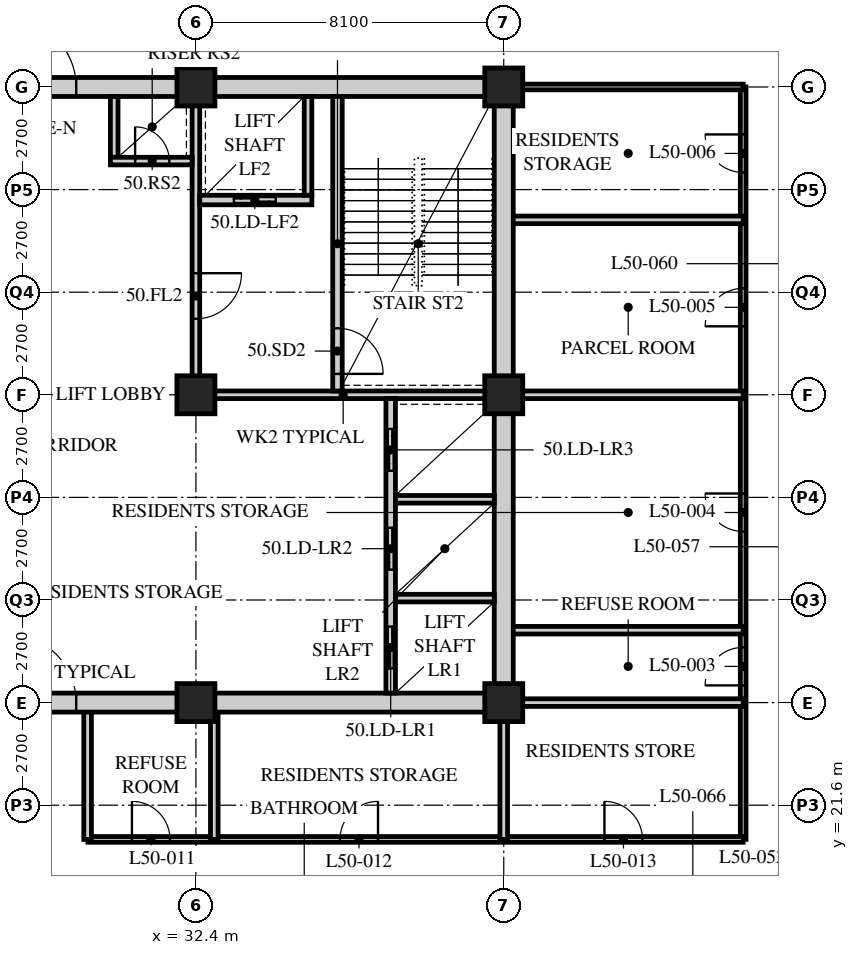
"""IFC4 building model, lengths in metres.
Left out: names, types, materials, properties, quantities, classifications, styles, units other than length and angle.
Written with IfcOpenShell. Run it as: python <this file> out.ifc"""

import sys

from ifc_helpers import new_model, si_unit, direction, frame, frame_2d, origin, origin_2d, place, context, subcontext, project, spatial, rectangle, hollow_rectangle, extrude, element, fill, save


model = new_model("IFC4")
c1 = context("Model", 3, precision=1e-05, world=origin(), true_north=direction((0.0, 1.0)))
c2 = subcontext(c1, "Body", "Model", "MODEL_VIEW")
j1 = project(units=[si_unit("LENGTHUNIT", "METRE"), si_unit("PLANEANGLEUNIT", "RADIAN")], contexts=[c1])
p1 = place(None, origin())
s1 = spatial("IfcSite", under=j1, at=p1, CompositionType="ELEMENT")
p2 = place(p1, origin())
s2 = spatial("IfcBuilding", under=s1, at=p2, CompositionType="ELEMENT")
p3 = place(p2, frame((0.0, 0.0, 195.6)))
s3 = spatial("IfcBuildingStorey", under=s2, at=p3, CompositionType="ELEMENT", Elevation=195.6)
for number, where, z_axis, x_axis in (
    (1, (32.4, 24.3, 0.0), (0.0, 0.0, 1.0), (1.0, 0.0, 0.0)),
    (2, (32.4, 32.4, 0.0), (0.0, 0.0, 1.0), (1.0, 0.0, 0.0)),
    (3, (32.4, 40.5, 0.0), (0.0, 0.0, 1.0), (1.0, 0.0, 0.0)),
    (4, (40.5, 24.3, 0.0), (0.0, 0.0, 1.0), (1.0, 0.0, 0.0)),
    (5, (40.5, 32.4, 0.0), (0.0, 0.0, 1.0), (1.0, 0.0, 0.0)),
    (6, (40.5, 40.5, 0.0), (0.0, 0.0, 1.0), (1.0, 0.0, 0.0)),
):
    element("IfcColumn", number, at=place(p3, frame(where, z_axis=z_axis, x_axis=x_axis)), inside=s3, PredefinedType="COLUMN", context=c2, shape_type="SweptSolid", body=[
        extrude(hollow_rectangle(XDim=1.0, YDim=1.0, WallThickness=0.1, at=origin_2d()), origin(), (0.0, 0.0, 1.0), 3.6),
    ])
p4 = place(p3, frame((46.8, 20.7, 0.0), z_axis=(0.0, 0.0, 1.0), x_axis=(0.0, 1.0, 0.0)))
e7 = element("IfcWall", 7, at=p4, inside=s3, PredefinedType="PARTITIONING", context=c2, shape_type="SweptSolid", body=[
    extrude(rectangle(XDim=19.8, YDim=0.15, at=frame_2d((9.9, 0.0))), origin(), (0.0, 0.0, 1.0), 3.39),
])
p5 = place(p4, frame((4.052, 0.0, 0.0)))
e8 = element("IfcOpeningElement", 8, at=p5, cuts=e7, PredefinedType="OPENING", context=c2, shape_type="SweptSolid", body=[
    extrude(rectangle(XDim=1.0, YDim=2.1, at=frame_2d((0.5, 1.05))), frame((0.0, 0.085, 0.0), z_axis=(0.0, -1.0, 0.0), x_axis=(1.0, 0.0, 0.0)), (0.0, 0.0, 1.0), 0.17),
])
p6 = place(p4, frame((8.102, 0.0, 0.0)))
e9 = element("IfcOpeningElement", 9, at=p6, cuts=e7, PredefinedType="OPENING", context=c2, shape_type="SweptSolid", body=[
    extrude(rectangle(XDim=1.0, YDim=2.1, at=frame_2d((0.5, 1.05))), frame((0.0, 0.085, 0.0), z_axis=(0.0, -1.0, 0.0), x_axis=(1.0, 0.0, 0.0)), (0.0, 0.0, 1.0), 0.17),
])
p7 = place(p4, frame((13.502, 0.0, 0.0)))
e10 = element("IfcOpeningElement", 10, at=p7, cuts=e7, PredefinedType="OPENING", context=c2, shape_type="SweptSolid", body=[
    extrude(rectangle(XDim=1.0, YDim=2.1, at=frame_2d((0.5, 1.05))), frame((0.0, 0.085, 0.0), z_axis=(0.0, -1.0, 0.0), x_axis=(1.0, 0.0, 0.0)), (0.0, 0.0, 1.0), 0.17),
])
p8 = place(p4, frame((17.552, 0.0, 0.0)))
e11 = element("IfcOpeningElement", 11, at=p8, cuts=e7, PredefinedType="OPENING", context=c2, shape_type="SweptSolid", body=[
    extrude(rectangle(XDim=1.0, YDim=2.1, at=frame_2d((0.5, 1.05))), frame((0.0, 0.085, 0.0), z_axis=(0.0, -1.0, 0.0), x_axis=(1.0, 0.0, 0.0)), (0.0, 0.0, 1.0), 0.17),
])
p9 = place(p3, frame((46.8, 40.5, 0.0), z_axis=(0.0, 0.0, 1.0), x_axis=(-1.0, 0.0, 0.0)))
e12 = element("IfcWall", 12, at=p9, inside=s3, PredefinedType="PARTITIONING", context=c2, shape_type="SweptSolid", body=[
    extrude(rectangle(XDim=6.1, YDim=0.15, at=frame_2d((3.05, 0.0))), origin(), (0.0, 0.0, 1.0), 3.39),
])
p10 = place(p3, frame((29.56, 20.7, 0.0), z_axis=(0.0, 0.0, 1.0), x_axis=(1.0, 0.0, 0.0)))
e13 = element("IfcWall", 13, at=p10, inside=s3, PredefinedType="PARTITIONING", context=c2, shape_type="SweptSolid", body=[
    extrude(rectangle(XDim=17.24, YDim=0.15, at=frame_2d((8.62, 0.0))), origin(), (0.0, 0.0, 1.0), 3.39),
])
p11 = place(p10, frame((1.157, 0.0, 0.0)))
e14 = element("IfcOpeningElement", 14, at=p11, cuts=e13, PredefinedType="OPENING", context=c2, shape_type="SweptSolid", body=[
    extrude(rectangle(XDim=1.0, YDim=2.1, at=frame_2d((0.5, 1.05))), frame((0.0, 0.085, 0.0), z_axis=(0.0, -1.0, 0.0), x_axis=(1.0, 0.0, 0.0)), (0.0, 0.0, 1.0), 0.17),
])
p12 = place(p10, frame((6.632, 0.0, 0.0)))
e15 = element("IfcOpeningElement", 15, at=p12, cuts=e13, PredefinedType="OPENING", context=c2, shape_type="SweptSolid", body=[
    extrude(rectangle(XDim=1.0, YDim=2.1, at=frame_2d((0.5, 1.05))), frame((0.0, 0.085, 0.0), z_axis=(0.0, -1.0, 0.0), x_axis=(1.0, 0.0, 0.0)), (0.0, 0.0, 1.0), 0.17),
])
p13 = place(p10, frame((13.59, 0.0, 0.0)))
e16 = element("IfcOpeningElement", 16, at=p13, cuts=e13, PredefinedType="OPENING", context=c2, shape_type="SweptSolid", body=[
    extrude(rectangle(XDim=1.0, YDim=2.1, at=frame_2d((0.5, 1.05))), frame((0.0, 0.085, 0.0), z_axis=(0.0, -1.0, 0.0), x_axis=(1.0, 0.0, 0.0)), (0.0, 0.0, 1.0), 0.17),
])
for number, where, z_axis, x_axis in (
    (17, (40.5, 32.4, 0.0), (0.0, 0.0, 1.0), (1.0, 0.0, 0.0)),
    (18, (46.8, 26.205, 0.0), (0.0, 0.0, 1.0), (-1.0, 0.0, 0.0)),
    (19, (46.8, 37.003, 0.0), (0.0, 0.0, 1.0), (-1.0, 0.0, 0.0)),
):
    element("IfcWall", number, at=place(p3, frame(where, z_axis=z_axis, x_axis=x_axis)), inside=s3, PredefinedType="SOLIDWALL", context=c2, shape_type="SweptSolid", body=[
        extrude(rectangle(XDim=6.3, YDim=0.2, at=frame_2d((3.15, 0.0))), origin(), (0.0, 0.0, 1.0), 3.39),
    ])
p14 = place(p3, frame((40.5, 20.7, 0.0), z_axis=(0.0, 0.0, 1.0), x_axis=(0.0, 1.0, 0.0)))
e20 = element("IfcWall", 20, at=p14, inside=s3, PredefinedType="SOLIDWALL", context=c2, shape_type="SweptSolid", body=[
    extrude(rectangle(XDim=3.6, YDim=0.2, at=frame_2d((1.8, 0.0))), origin(), (0.0, 0.0, 1.0), 2.778),
])
for number, where, z_axis, x_axis in (
    (21, (32.883, 20.7, 0.0), (0.0, 0.0, 1.0), (0.0, 1.0, 0.0)),
    (22, (29.55, 20.7, 0.0), (0.0, 0.0, 1.0), (0.0, 1.0, 0.0)),
):
    element("IfcWall", number, at=place(p3, frame(where, z_axis=z_axis, x_axis=x_axis)), inside=s3, PredefinedType="SOLIDWALL", context=c2, shape_type="SweptSolid", body=[
        extrude(rectangle(XDim=3.6, YDim=0.2, at=frame_2d((1.8, 0.0))), origin(), (0.0, 0.0, 1.0), 3.39),
    ])
p15 = place(p3, frame((40.5, 24.3, 0.0), z_axis=(0.0, 0.0, 1.0), x_axis=(1.0, 0.0, 0.0)))
e23 = element("IfcWall", 23, at=p15, inside=s3, PredefinedType="SOLIDWALL", context=c2, shape_type="SweptSolid", body=[
    extrude(rectangle(XDim=6.3, YDim=0.2, at=frame_2d((3.15, 0.0))), origin(), (0.0, 0.0, 1.0), 3.39),
])
p16 = place(p3, frame((15.95, 24.3, 0.0), z_axis=(0.0, 0.0, 1.0), x_axis=(1.0, 0.0, 0.0)))
e24 = element("IfcWall", 24, at=p16, inside=s3, PredefinedType="SOLIDWALL", context=c2, shape_type="SweptSolid", body=[
    extrude(rectangle(XDim=24.8, YDim=0.5, at=frame_2d((12.4, 0.0))), origin(), (0.0, 0.0, 1.0), 2.74),
])
p17 = place(p16, frame((11.5, 0.0, 0.0)))
e25 = element("IfcOpeningElement", 25, at=p17, cuts=e24, PredefinedType="OPENING", context=c2, shape_type="SweptSolid", body=[
    extrude(rectangle(XDim=1.8, YDim=2.4, at=frame_2d((0.9, 1.2))), frame((0.0, 0.26, 0.0), z_axis=(0.0, -1.0, 0.0), x_axis=(1.0, 0.0, 0.0)), (0.0, 0.0, 1.0), 0.52),
])
p18 = place(p3, frame((15.95, 40.5, 0.0), z_axis=(0.0, 0.0, 1.0), x_axis=(1.0, 0.0, 0.0)))
e26 = element("IfcWall", 26, at=p18, inside=s3, PredefinedType="SOLIDWALL", context=c2, shape_type="SweptSolid", body=[
    extrude(rectangle(XDim=24.8, YDim=0.5, at=frame_2d((12.4, 0.0))), origin(), (0.0, 0.0, 1.0), 2.74),
])
p19 = place(p18, frame((11.5, 0.0, 0.0)))
e27 = element("IfcOpeningElement", 27, at=p19, cuts=e26, PredefinedType="OPENING", context=c2, shape_type="SweptSolid", body=[
    extrude(rectangle(XDim=1.8, YDim=2.4, at=frame_2d((0.9, 1.2))), frame((0.0, 0.26, 0.0), z_axis=(0.0, -1.0, 0.0), x_axis=(1.0, 0.0, 0.0)), (0.0, 0.0, 1.0), 0.52),
])
p20 = place(p3, frame((40.5, 24.55, 0.0), z_axis=(0.0, 0.0, 1.0), x_axis=(0.0, 1.0, 0.0)))
e28 = element("IfcWall", 28, at=p20, inside=s3, PredefinedType="SOLIDWALL", context=c2, shape_type="SweptSolid", body=[
    extrude(rectangle(XDim=15.7, YDim=0.5, at=frame_2d((7.85, 0.0))), origin(), (0.0, 0.0, 1.0), 2.778),
])
p21 = place(p3, frame((32.3, 32.4, 0.0), z_axis=(0.0, 0.0, 1.0), x_axis=(1.0, 0.0, 0.0)))
e29 = element("IfcWall", 29, at=p21, inside=s3, PredefinedType="SOLIDWALL", context=c2, shape_type="SweptSolid", body=[
    extrude(rectangle(XDim=7.95, YDim=0.2, at=frame_2d((3.975, 0.0))), origin(), (0.0, 0.0, 1.0), 2.778),
])
p22 = place(p3, frame((32.4, 32.5, 0.0), z_axis=(0.0, 0.0, 1.0), x_axis=(0.0, 1.0, 0.0)))
e30 = element("IfcWall", 30, at=p22, inside=s3, PredefinedType="SOLIDWALL", context=c2, shape_type="SweptSolid", body=[
    extrude(rectangle(XDim=7.75, YDim=0.2, at=frame_2d((3.875, 0.0))), origin(), (0.0, 0.0, 1.0), 2.778),
])
p23 = place(p22, frame((1.9, 0.0, 0.0)))
e31 = element("IfcOpeningElement", 31, at=p23, cuts=e30, PredefinedType="OPENING", context=c2, shape_type="SweptSolid", body=[
    extrude(rectangle(XDim=1.2, YDim=2.1, at=frame_2d((0.6, 1.05))), frame((0.0, 0.11, 0.0), z_axis=(0.0, -1.0, 0.0), x_axis=(1.0, 0.0, 0.0)), (0.0, 0.0, 1.0), 0.22),
])
p24 = place(p3, frame((37.525, 24.55, 0.0), z_axis=(0.0, 0.0, 1.0), x_axis=(0.0, 1.0, 0.0)))
e32 = element("IfcWall", 32, at=p24, inside=s3, PredefinedType="SOLIDWALL", context=c2, shape_type="SweptSolid", body=[
    extrude(rectangle(XDim=7.75, YDim=0.25, at=frame_2d((3.875, 0.0))), origin(), (0.0, 0.0, 1.0), 3.39),
])
p25 = place(p24, frame((0.65, 0.0, 0.0)))
e33 = element("IfcOpeningElement", 33, at=p25, cuts=e32, PredefinedType="OPENING", context=c2, shape_type="SweptSolid", body=[
    extrude(rectangle(XDim=1.1, YDim=2.4, at=frame_2d((0.55, 1.2))), frame((0.0, 0.135, 0.0), z_axis=(0.0, -1.0, 0.0), x_axis=(1.0, 0.0, 0.0)), (0.0, 0.0, 1.0), 0.27),
])
p26 = place(p24, frame((3.25, 0.0, 0.0)))
e34 = element("IfcOpeningElement", 34, at=p26, cuts=e32, PredefinedType="OPENING", context=c2, shape_type="SweptSolid", body=[
    extrude(rectangle(XDim=1.1, YDim=2.4, at=frame_2d((0.55, 1.2))), frame((0.0, 0.135, 0.0), z_axis=(0.0, -1.0, 0.0), x_axis=(1.0, 0.0, 0.0)), (0.0, 0.0, 1.0), 0.27),
])
p27 = place(p24, frame((5.85, 0.0, 0.0)))
e35 = element("IfcOpeningElement", 35, at=p27, cuts=e32, PredefinedType="OPENING", context=c2, shape_type="SweptSolid", body=[
    extrude(rectangle(XDim=1.1, YDim=2.4, at=frame_2d((0.55, 1.2))), frame((0.0, 0.135, 0.0), z_axis=(0.0, -1.0, 0.0), x_axis=(1.0, 0.0, 0.0)), (0.0, 0.0, 1.0), 0.27),
])
for number, where, z_axis, x_axis in (
    (36, (37.65, 27.05, 0.0), (0.0, 0.0, 1.0), (1.0, 0.0, 0.0)),
    (37, (37.65, 29.65, 0.0), (0.0, 0.0, 1.0), (1.0, 0.0, 0.0)),
):
    element("IfcWall", number, at=place(p3, frame(where, z_axis=z_axis, x_axis=x_axis)), inside=s3, PredefinedType="SOLIDWALL", context=c2, shape_type="SweptSolid", body=[
        extrude(rectangle(XDim=2.6, YDim=0.2, at=frame_2d((1.3, 0.0))), origin(), (0.0, 0.0, 1.0), 3.39),
    ])
p28 = place(p3, frame((36.125, 32.5, 0.0), z_axis=(0.0, 0.0, 1.0), x_axis=(0.0, 1.0, 0.0)))
e38 = element("IfcWall", 38, at=p28, inside=s3, PredefinedType="SOLIDWALL", context=c2, shape_type="SweptSolid", body=[
    extrude(rectangle(XDim=7.75, YDim=0.25, at=frame_2d((3.875, 0.0))), origin(), (0.0, 0.0, 1.0), 3.39),
])
p29 = place(p28, frame((0.45, 0.0, 0.0)))
e39 = element("IfcOpeningElement", 39, at=p29, cuts=e38, PredefinedType="OPENING", context=c2, shape_type="SweptSolid", body=[
    extrude(rectangle(XDim=1.2, YDim=2.1, at=frame_2d((0.6, 1.05))), frame((0.0, 0.135, 0.0), z_axis=(0.0, -1.0, 0.0), x_axis=(1.0, 0.0, 0.0)), (0.0, 0.0, 1.0), 0.27),
])
p30 = place(p3, frame((32.5, 37.525, 0.0), z_axis=(0.0, 0.0, 1.0), x_axis=(1.0, 0.0, 0.0)))
e40 = element("IfcWall", 40, at=p30, inside=s3, PredefinedType="SOLIDWALL", context=c2, shape_type="SweptSolid", body=[
    extrude(rectangle(XDim=2.95, YDim=0.25, at=frame_2d((1.475, 0.0))), origin(), (0.0, 0.0, 1.0), 3.39),
])
p31 = place(p30, frame((0.9, 0.0, 0.0)))
e41 = element("IfcOpeningElement", 41, at=p31, cuts=e40, PredefinedType="OPENING", context=c2, shape_type="SweptSolid", body=[
    extrude(rectangle(XDim=1.1, YDim=2.4, at=frame_2d((0.55, 1.2))), frame((0.0, 0.135, 0.0), z_axis=(0.0, -1.0, 0.0), x_axis=(1.0, 0.0, 0.0)), (0.0, 0.0, 1.0), 0.27),
])
p32 = place(p3, frame((35.35, 37.65, 0.0), z_axis=(0.0, 0.0, 1.0), x_axis=(0.0, 1.0, 0.0)))
e42 = element("IfcWall", 42, at=p32, inside=s3, PredefinedType="SOLIDWALL", context=c2, shape_type="SweptSolid", body=[
    extrude(rectangle(XDim=2.6, YDim=0.2, at=frame_2d((1.3, 0.0))), origin(), (0.0, 0.0, 1.0), 3.39),
])
p33 = place(p3, frame((30.25, 38.65, 0.0), z_axis=(0.0, 0.0, 1.0), x_axis=(0.0, 1.0, 0.0)))
e43 = element("IfcWall", 43, at=p33, inside=s3, PredefinedType="SOLIDWALL", context=c2, shape_type="SweptSolid", body=[
    extrude(rectangle(XDim=1.6, YDim=0.2, at=frame_2d((0.8, 0.0))), origin(), (0.0, 0.0, 1.0), 3.39),
])
p34 = place(p3, frame((30.15, 38.55, 0.0), z_axis=(0.0, 0.0, 1.0), x_axis=(1.0, 0.0, 0.0)))
e44 = element("IfcWall", 44, at=p34, inside=s3, PredefinedType="SOLIDWALL", context=c2, shape_type="SweptSolid", body=[
    extrude(rectangle(XDim=2.15, YDim=0.2, at=frame_2d((1.075, 0.0))), origin(), (0.0, 0.0, 1.0), 3.39),
])
p35 = place(p34, frame((0.65, 0.0, 0.0)))
e45 = element("IfcOpeningElement", 45, at=p35, cuts=e44, PredefinedType="OPENING", context=c2, shape_type="SweptSolid", body=[
    extrude(rectangle(XDim=0.9, YDim=2.1, at=frame_2d((0.45, 1.05))), frame((0.0, 0.11, 0.0), z_axis=(0.0, -1.0, 0.0), x_axis=(1.0, 0.0, 0.0)), (0.0, 0.0, 1.0), 0.22),
])
p36 = place(p5, origin())
e46 = element("IfcDoor", 46, at=p36, inside=s3, OperationType="SINGLE_SWING_LEFT", PredefinedType="DOOR", context=c2, shape_type="SweptSolid", body=[
    extrude(rectangle(XDim=1.0, YDim=2.1, at=frame_2d((0.5, 1.05))), frame((0.0, 0.025, 0.0), z_axis=(0.0, -1.0, 0.0), x_axis=(1.0, 0.0, 0.0)), (0.0, 0.0, 1.0), 0.05),
])
fill(e8, e46)
p37 = place(p6, origin())
e47 = element("IfcDoor", 47, at=p37, inside=s3, OperationType="SINGLE_SWING_RIGHT", PredefinedType="DOOR", context=c2, shape_type="SweptSolid", body=[
    extrude(rectangle(XDim=1.0, YDim=2.1, at=frame_2d((0.5, 1.05))), frame((0.0, 0.025, 0.0), z_axis=(0.0, -1.0, 0.0), x_axis=(1.0, 0.0, 0.0)), (0.0, 0.0, 1.0), 0.05),
])
fill(e9, e47)
p38 = place(p7, origin())
e48 = element("IfcDoor", 48, at=p38, inside=s3, OperationType="SINGLE_SWING_LEFT", PredefinedType="DOOR", context=c2, shape_type="SweptSolid", body=[
    extrude(rectangle(XDim=1.0, YDim=2.1, at=frame_2d((0.5, 1.05))), frame((0.0, 0.025, 0.0), z_axis=(0.0, -1.0, 0.0), x_axis=(1.0, 0.0, 0.0)), (0.0, 0.0, 1.0), 0.05),
])
fill(e10, e48)
p39 = place(p8, origin())
e49 = element("IfcDoor", 49, at=p39, inside=s3, OperationType="SINGLE_SWING_RIGHT", PredefinedType="DOOR", context=c2, shape_type="SweptSolid", body=[
    extrude(rectangle(XDim=1.0, YDim=2.1, at=frame_2d((0.5, 1.05))), frame((0.0, 0.025, 0.0), z_axis=(0.0, -1.0, 0.0), x_axis=(1.0, 0.0, 0.0)), (0.0, 0.0, 1.0), 0.05),
])
fill(e11, e49)
p40 = place(p11, origin())
e50 = element("IfcDoor", 50, at=p40, inside=s3, OperationType="SINGLE_SWING_LEFT", PredefinedType="DOOR", context=c2, shape_type="SweptSolid", body=[
    extrude(rectangle(XDim=1.0, YDim=2.1, at=frame_2d((0.5, 1.05))), frame((0.0, 0.025, 0.0), z_axis=(0.0, -1.0, 0.0), x_axis=(1.0, 0.0, 0.0)), (0.0, 0.0, 1.0), 0.05),
])
fill(e14, e50)
p41 = place(p12, origin())
e51 = element("IfcDoor", 51, at=p41, inside=s3, OperationType="SINGLE_SWING_RIGHT", PredefinedType="DOOR", context=c2, shape_type="SweptSolid", body=[
    extrude(rectangle(XDim=1.0, YDim=2.1, at=frame_2d((0.5, 1.05))), frame((0.0, 0.025, 0.0), z_axis=(0.0, -1.0, 0.0), x_axis=(1.0, 0.0, 0.0)), (0.0, 0.0, 1.0), 0.05),
])
fill(e15, e51)
p42 = place(p13, origin())
e52 = element("IfcDoor", 52, at=p42, inside=s3, OperationType="SINGLE_SWING_LEFT", PredefinedType="DOOR", context=c2, shape_type="SweptSolid", body=[
    extrude(rectangle(XDim=1.0, YDim=2.1, at=frame_2d((0.5, 1.05))), frame((0.0, 0.025, 0.0), z_axis=(0.0, -1.0, 0.0), x_axis=(1.0, 0.0, 0.0)), (0.0, 0.0, 1.0), 0.05),
])
fill(e16, e52)
p43 = place(p29, origin())
e53 = element("IfcDoor", 53, at=p43, inside=s3, OperationType="SINGLE_SWING_RIGHT", PredefinedType="DOOR", context=c2, shape_type="SweptSolid", body=[
    extrude(rectangle(XDim=1.2, YDim=2.1, at=frame_2d((0.6, 1.05))), frame((0.0, 0.025, 0.0), z_axis=(0.0, -1.0, 0.0), x_axis=(1.0, 0.0, 0.0)), (0.0, 0.0, 1.0), 0.05),
])
fill(e39, e53)
p44 = place(p23, origin())
e54 = element("IfcDoor", 54, at=p44, inside=s3, OperationType="SINGLE_SWING_LEFT", PredefinedType="DOOR", context=c2, shape_type="SweptSolid", body=[
    extrude(rectangle(XDim=1.2, YDim=2.1, at=frame_2d((0.6, 1.05))), frame((0.0, 0.025, 0.0), z_axis=(0.0, -1.0, 0.0), x_axis=(1.0, 0.0, 0.0)), (0.0, 0.0, 1.0), 0.05),
])
fill(e31, e54)
p45 = place(p35, origin())
e55 = element("IfcDoor", 55, at=p45, inside=s3, OperationType="SINGLE_SWING_LEFT", PredefinedType="DOOR", context=c2, shape_type="SweptSolid", body=[
    extrude(rectangle(XDim=0.9, YDim=2.1, at=frame_2d((0.45, 1.05))), frame((0.0, 0.025, 0.0), z_axis=(0.0, -1.0, 0.0), x_axis=(1.0, 0.0, 0.0)), (0.0, 0.0, 1.0), 0.05),
])
fill(e45, e55)
p46 = place(p25, origin())
e56 = element("IfcDoor", 56, at=p46, inside=s3, OperationType="DOUBLE_DOOR_SLIDING", PredefinedType="DOOR", context=c2, shape_type="SweptSolid", body=[
    extrude(rectangle(XDim=1.1, YDim=2.4, at=frame_2d((0.55, 1.2))), frame((0.0, 0.025, 0.0), z_axis=(0.0, -1.0, 0.0), x_axis=(1.0, 0.0, 0.0)), (0.0, 0.0, 1.0), 0.05),
])
fill(e33, e56)
p47 = place(p26, origin())
e57 = element("IfcDoor", 57, at=p47, inside=s3, OperationType="DOUBLE_DOOR_SLIDING", PredefinedType="DOOR", context=c2, shape_type="SweptSolid", body=[
    extrude(rectangle(XDim=1.1, YDim=2.4, at=frame_2d((0.55, 1.2))), frame((0.0, 0.025, 0.0), z_axis=(0.0, -1.0, 0.0), x_axis=(1.0, 0.0, 0.0)), (0.0, 0.0, 1.0), 0.05),
])
fill(e34, e57)
p48 = place(p27, origin())
e58 = element("IfcDoor", 58, at=p48, inside=s3, OperationType="DOUBLE_DOOR_SLIDING", PredefinedType="DOOR", context=c2, shape_type="SweptSolid", body=[
    extrude(rectangle(XDim=1.1, YDim=2.4, at=frame_2d((0.55, 1.2))), frame((0.0, 0.025, 0.0), z_axis=(0.0, -1.0, 0.0), x_axis=(1.0, 0.0, 0.0)), (0.0, 0.0, 1.0), 0.05),
])
fill(e35, e58)
p49 = place(p31, origin())
e59 = element("IfcDoor", 59, at=p49, inside=s3, OperationType="DOUBLE_DOOR_SLIDING", PredefinedType="DOOR", context=c2, shape_type="SweptSolid", body=[
    extrude(rectangle(XDim=1.1, YDim=2.4, at=frame_2d((0.55, 1.2))), frame((0.0, 0.025, 0.0), z_axis=(0.0, -1.0, 0.0), x_axis=(1.0, 0.0, 0.0)), (0.0, 0.0, 1.0), 0.05),
])
fill(e41, e59)
p50 = place(p17, origin())
e60 = element("IfcDoor", 60, at=p50, inside=s3, OperationType="DOUBLE_DOOR_SINGLE_SWING", PredefinedType="DOOR", context=c2, shape_type="SweptSolid", body=[
    extrude(rectangle(XDim=1.8, YDim=2.4, at=frame_2d((0.9, 1.2))), frame((0.0, 0.025, 0.0), z_axis=(0.0, -1.0, 0.0), x_axis=(1.0, 0.0, 0.0)), (0.0, 0.0, 1.0), 0.05),
])
fill(e25, e60)
p51 = place(p19, origin())
e61 = element("IfcDoor", 61, at=p51, inside=s3, OperationType="DOUBLE_DOOR_SINGLE_SWING", PredefinedType="DOOR", context=c2, shape_type="SweptSolid", body=[
    extrude(rectangle(XDim=1.8, YDim=2.4, at=frame_2d((0.9, 1.2))), frame((0.0, 0.025, 0.0), z_axis=(0.0, -1.0, 0.0), x_axis=(1.0, 0.0, 0.0)), (0.0, 0.0, 1.0), 0.05),
])
fill(e27, e61)
save(model, sys.argv[1])
